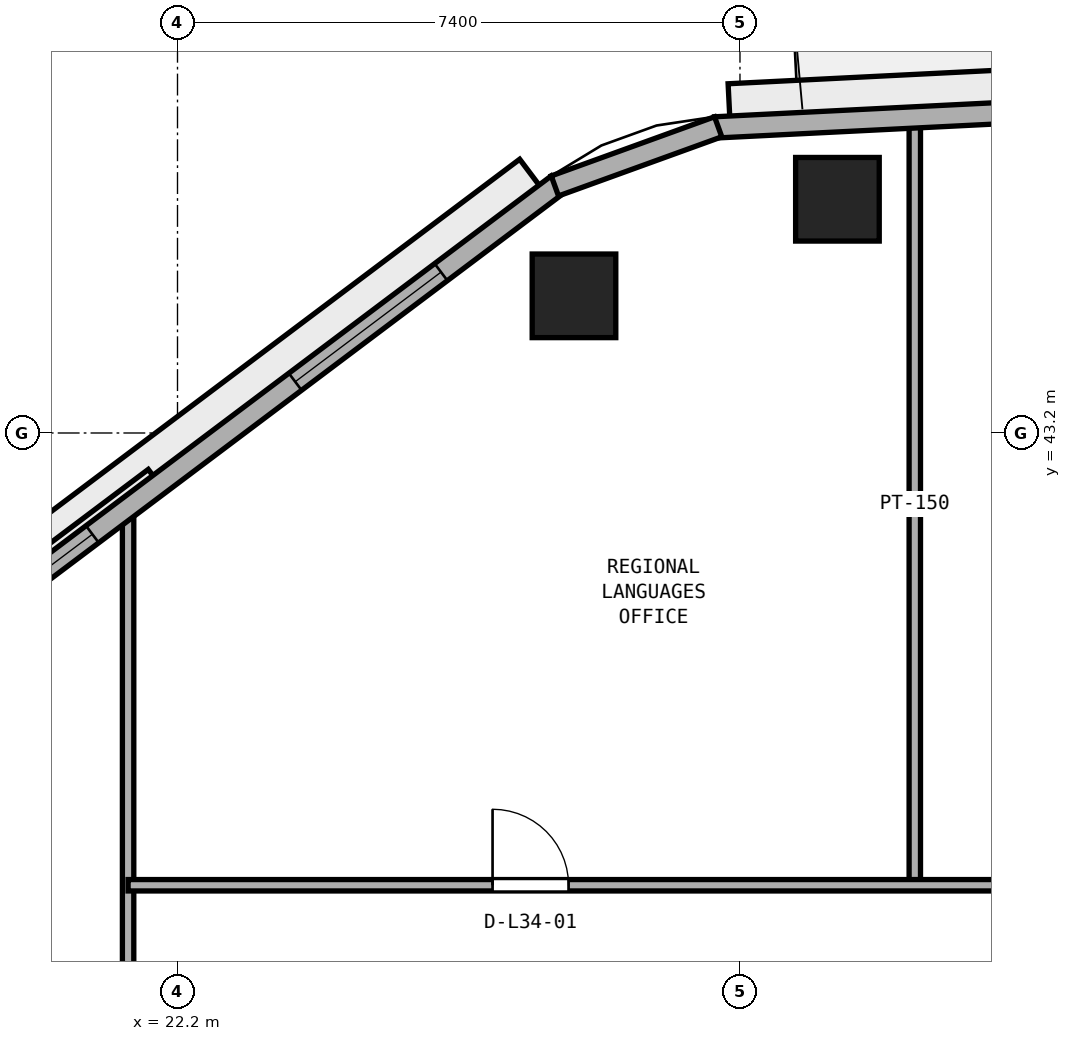
"""IFC4 building model, lengths in metres.
Left out: names, types, materials, properties, quantities, classifications, styles, units other than length and angle.
Written with IfcOpenShell. Run it as: python <this file> out.ifc"""

import sys

from ifc_helpers import new_model, si_unit, direction, frame, frame_2d, origin, origin_2d, place, context, subcontext, project, spatial, rectangle, extrude, element, fill, save


model = new_model("IFC4")
c1 = context("Model", 3, precision=1e-05, world=origin(), true_north=direction((0.0, 1.0)))
c2 = subcontext(c1, "Body", "Model", "MODEL_VIEW")
j1 = project(units=[si_unit("LENGTHUNIT", "METRE"), si_unit("PLANEANGLEUNIT", "RADIAN")], contexts=[c1])
p1 = place(None, origin())
s1 = spatial("IfcSite", under=j1, at=p1, CompositionType="ELEMENT")
p2 = place(p1, origin())
s2 = spatial("IfcBuilding", under=s1, at=p2, CompositionType="ELEMENT")
p3 = place(p2, frame((0.0, 0.0, 136.4)))
s3 = spatial("IfcBuildingStorey", under=s2, at=p3, CompositionType="ELEMENT", Elevation=136.4)
for number, where, z_axis, x_axis in (
    (1, (30.882, 46.275, 0.0), (0.0, 0.0, 1.0), (1.0, 0.0, 0.0)),
    (2, (27.416, 45.004, 0.0), (0.0, 0.0, 1.0), (1.0, 0.0, 0.0)),
):
    element("IfcColumn", number, at=place(p3, frame(where, z_axis=z_axis, x_axis=x_axis)), inside=s3, PredefinedType="COLUMN", context=c2, shape_type="SweptSolid", body=[
        extrude(rectangle(XDim=1.1, YDim=1.1, at=origin_2d()), origin(), (0.0, 0.0, 1.0), 3.8),
    ])
p4 = place(p3, frame((31.9, 37.25, 0.0), z_axis=(0.0, 0.0, 1.0), x_axis=(0.0, 1.0, 0.0)))
e3 = element("IfcWall", 3, at=p4, inside=s3, PredefinedType="PARTITIONING", context=c2, shape_type="SweptSolid", body=[
    extrude(rectangle(XDim=10.037, YDim=0.15, at=frame_2d((5.019, 0.0))), origin(), (0.0, 0.0, 1.0), 3.54),
])
p5 = place(p3, frame((21.55, 26.55, 0.0), z_axis=(0.0, 0.0, 1.0), x_axis=(0.0, 1.0, 0.0)))
e4 = element("IfcWall", 4, at=p5, inside=s3, PredefinedType="PARTITIONING", context=c2, shape_type="SweptSolid", body=[
    extrude(rectangle(XDim=15.706, YDim=0.15, at=frame_2d((7.853, 0.0))), origin(), (0.0, 0.0, 1.0), 3.54),
])
p6 = place(p5, frame((7.975, 0.0, 0.0)))
e5 = element("IfcOpeningElement", 5, at=p6, cuts=e4, PredefinedType="OPENING", context=c2, shape_type="SweptSolid", body=[
    extrude(rectangle(XDim=0.9, YDim=2.1, at=frame_2d((0.45, 1.05))), frame((0.0, 0.085, 0.0), z_axis=(0.0, -1.0, 0.0), x_axis=(1.0, 0.0, 0.0)), (0.0, 0.0, 1.0), 0.17),
])
p7 = place(p3, frame((21.55, 37.25, 0.0), z_axis=(0.0, 0.0, 1.0), x_axis=(1.0, 0.0, 0.0)))
e6 = element("IfcWall", 6, at=p7, inside=s3, PredefinedType="PARTITIONING", context=c2, shape_type="SweptSolid", body=[
    extrude(rectangle(XDim=12.85, YDim=0.15, at=frame_2d((6.425, 0.0))), origin(), (0.0, 0.0, 1.0), 3.54),
])
p8 = place(p7, frame((4.795, 0.0, 0.0)))
e7 = element("IfcOpeningElement", 7, at=p8, cuts=e6, PredefinedType="OPENING", context=c2, shape_type="SweptSolid", body=[
    extrude(rectangle(XDim=1.0, YDim=2.12, at=frame_2d((0.5, 1.06))), frame((0.0, 0.085, 0.0), z_axis=(0.0, -1.0, 0.0), x_axis=(1.0, 0.0, 0.0)), (0.0, 0.0, 1.0), 0.17),
])
p9 = place(p3, frame((46.632, 48.091, 0.0), z_axis=(0.0, 0.0, 1.0), x_axis=(-0.998744129094, -0.050101542886, 0.0)))
e8 = element("IfcWall", 8, at=p9, inside=s3, PredefinedType="STANDARD", context=c2, shape_type="SweptSolid", body=[
    extrude(rectangle(XDim=17.382, YDim=0.28, at=frame_2d((8.691, 0.0))), origin(), (0.0, 0.0, 1.0), 3.54),
])
p10 = place(p9, frame((8.141, 0.0, 0.0)))
e9 = element("IfcOpeningElement", 9, at=p10, cuts=e8, PredefinedType="OPENING", context=c2, shape_type="SweptSolid", body=[
    extrude(rectangle(XDim=1.1, YDim=2.2, at=frame_2d((0.55, 1.1))), frame((0.0, 0.15, 0.0), z_axis=(0.0, -1.0, 0.0), x_axis=(1.0, 0.0, 0.0)), (0.0, 0.0, 1.0), 0.3),
])
p11 = place(p9, frame((2.03, 0.0, 0.9)))
e10 = element("IfcOpeningElement", 10, at=p11, cuts=e8, PredefinedType="OPENING", context=c2, shape_type="SweptSolid", body=[
    extrude(rectangle(XDim=2.4, YDim=1.75, at=frame_2d((1.2, 0.875))), frame((0.0, 0.15, 0.0), z_axis=(0.0, -1.0, 0.0), x_axis=(1.0, 0.0, 0.0)), (0.0, 0.0, 1.0), 0.3),
])
p12 = place(p3, frame((27.201, 46.47, 0.0), z_axis=(0.0, 0.0, 1.0), x_axis=(-0.799280853427, -0.600957666849, 0.0)))
e11 = element("IfcWall", 11, at=p12, inside=s3, PredefinedType="STANDARD", context=c2, shape_type="SweptSolid", body=[
    extrude(rectangle(XDim=16.716, YDim=0.28, at=frame_2d((8.358, 0.0))), origin(), (0.0, 0.0, 1.0), 3.54),
])
p13 = place(p12, frame((1.919, 0.0, 0.9)))
e12 = element("IfcOpeningElement", 12, at=p13, cuts=e11, PredefinedType="OPENING", context=c2, shape_type="SweptSolid", body=[
    extrude(rectangle(XDim=2.4, YDim=1.75, at=frame_2d((1.2, 0.875))), frame((0.0, 0.15, 0.0), z_axis=(0.0, -1.0, 0.0), x_axis=(1.0, 0.0, 0.0)), (0.0, 0.0, 1.0), 0.3),
])
p14 = place(p12, frame((7.658, 0.0, 0.9)))
e13 = element("IfcOpeningElement", 13, at=p14, cuts=e11, PredefinedType="OPENING", context=c2, shape_type="SweptSolid", body=[
    extrude(rectangle(XDim=2.4, YDim=1.75, at=frame_2d((1.2, 0.875))), frame((0.0, 0.15, 0.0), z_axis=(0.0, -1.0, 0.0), x_axis=(1.0, 0.0, 0.0)), (0.0, 0.0, 1.0), 0.3),
])
p15 = place(p12, frame((12.397, 0.0, 0.9)))
e14 = element("IfcOpeningElement", 14, at=p15, cuts=e11, PredefinedType="OPENING", context=c2, shape_type="SweptSolid", body=[
    extrude(rectangle(XDim=2.4, YDim=1.75, at=frame_2d((1.2, 0.875))), frame((0.0, 0.15, 0.0), z_axis=(0.0, -1.0, 0.0), x_axis=(1.0, 0.0, 0.0)), (0.0, 0.0, 1.0), 0.3),
])
p16 = place(p3, frame((29.313, 47.228, 0.0), z_axis=(0.0, 0.0, 1.0), x_axis=(-0.940226330758, -0.340550212084, 0.0)))
e15 = element("IfcWall", 15, at=p16, inside=s3, PredefinedType="STANDARD", context=c2, shape_type="SweptSolid", body=[
    extrude(rectangle(XDim=2.285, YDim=0.28, at=frame_2d((1.142, 0.0))), origin(), (0.0, 0.0, 1.0), 3.54),
])
p17 = place(p8, origin())
e16 = element("IfcDoor", 16, at=p17, inside=s3, OperationType="SINGLE_SWING_LEFT", PredefinedType="DOOR", context=c2, shape_type="SweptSolid", body=[
    extrude(rectangle(XDim=1.0, YDim=2.12, at=frame_2d((0.5, 1.06))), frame((0.0, 0.025, 0.0), z_axis=(0.0, -1.0, 0.0), x_axis=(1.0, 0.0, 0.0)), (0.0, 0.0, 1.0), 0.05),
])
fill(e7, e16)
p18 = place(p13, origin())
e17 = element("IfcWindow", 17, at=p18, inside=s3, PartitioningType="SINGLE_PANEL", PredefinedType="WINDOW", context=c2, shape_type="SweptSolid", body=[
    extrude(rectangle(XDim=2.4, YDim=1.75, at=frame_2d((1.2, 0.875))), frame((0.0, 0.03, 0.0), z_axis=(0.0, -1.0, 0.0), x_axis=(1.0, 0.0, 0.0)), (0.0, 0.0, 1.0), 0.06),
])
fill(e12, e17)
p19 = place(p14, origin())
e18 = element("IfcWindow", 18, at=p19, inside=s3, PartitioningType="SINGLE_PANEL", PredefinedType="WINDOW", context=c2, shape_type="SweptSolid", body=[
    extrude(rectangle(XDim=2.4, YDim=1.75, at=frame_2d((1.2, 0.875))), frame((0.0, 0.03, 0.0), z_axis=(0.0, -1.0, 0.0), x_axis=(1.0, 0.0, 0.0)), (0.0, 0.0, 1.0), 0.06),
])
fill(e13, e18)
save(model, sys.argv[1])
